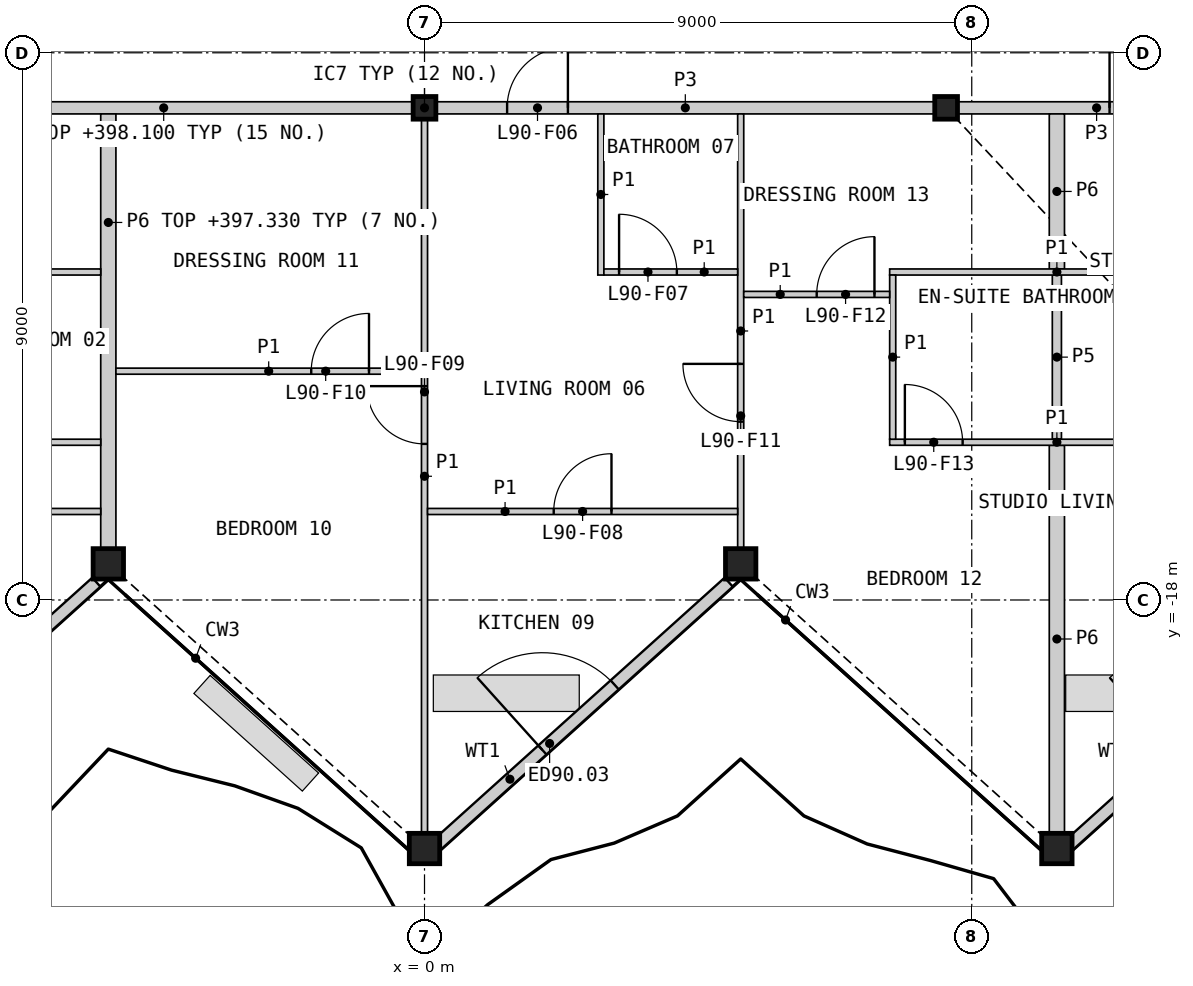
"""IFC4 building model, lengths in metres.
Left out: names, types, materials, properties, quantities, classifications, styles, units other than length and angle.
Written with IfcOpenShell. Run it as: python <this file> out.ifc"""

import sys

from ifc_helpers import new_model, si_unit, direction, frame, frame_2d, origin, origin_2d, place, context, subcontext, project, spatial, rectangle, hollow_rectangle, i_section, extrude, element, fill, save


model = new_model("IFC4")
c1 = context("Model", 3, precision=1e-05, world=origin(), true_north=direction((0.0, 1.0)))
c2 = subcontext(c1, "Body", "Model", "MODEL_VIEW")
j1 = project(units=[si_unit("LENGTHUNIT", "METRE"), si_unit("PLANEANGLEUNIT", "RADIAN")], contexts=[c1])
p1 = place(None, origin())
s1 = spatial("IfcSite", under=j1, at=p1, CompositionType="ELEMENT")
p2 = place(p1, origin())
s2 = spatial("IfcBuilding", under=s1, at=p2, CompositionType="ELEMENT")
p3 = place(p2, frame((0.0, 0.0, 395.0)))
s3 = spatial("IfcBuildingStorey", under=s2, at=p3, CompositionType="ELEMENT", Elevation=395.0)
for number, where, z_axis, x_axis in (
    (1, (-5.2, -17.406, 0.0), (0.0, 0.0, 1.0), (1.0, 0.0, 0.0)),
    (2, (0.0, -22.088, 0.0), (0.0, 0.0, 1.0), (1.0, 0.0, 0.0)),
    (3, (5.2, -17.406, 0.0), (0.0, 0.0, 1.0), (1.0, 0.0, 0.0)),
    (4, (10.4, -22.088, 0.0), (0.0, 0.0, 1.0), (1.0, 0.0, 0.0)),
):
    element("IfcColumn", number, at=place(p3, frame(where, z_axis=z_axis, x_axis=x_axis)), inside=s3, PredefinedType="COLUMN", context=c2, shape_type="SweptSolid", body=[
        extrude(hollow_rectangle(XDim=0.5, YDim=0.5, WallThickness=0.03, at=origin_2d()), origin(), (0.0, 0.0, 1.0), 3.4),
    ])
for number, where, z_axis, x_axis in (
    (5, (0.0, -9.906, 0.0), (0.0, 0.0, 1.0), (1.0, 0.0, 0.0)),
    (6, (8.578, -9.906, 0.0), (0.0, 0.0, 1.0), (1.0, 0.0, 0.0)),
):
    element("IfcColumn", number, at=place(p3, frame(where, z_axis=z_axis, x_axis=x_axis)), inside=s3, PredefinedType="COLUMN", context=c2, shape_type="SweptSolid", body=[
        extrude(i_section(OverallWidth=0.374, OverallDepth=0.372, WebThickness=0.016, FlangeThickness=0.026, at=origin_2d()), origin(), (0.0, 0.0, 1.0), 3.4),
    ])
p4 = place(p3, frame((-10.195, -22.028, 0.0), z_axis=(0.0, 0.0, 1.0), x_axis=(0.743136196971, 0.669140189162, 0.0)))
e7 = element("IfcWall", 7, at=p4, inside=s3, PredefinedType="SOLIDWALL", context=c2, shape_type="SweptSolid", body=[
    extrude(rectangle(XDim=6.457, YDim=0.2, at=frame_2d((3.229, 0.0))), origin(), (0.0, 0.0, 1.0), 2.634),
])
p5 = place(p4, frame((2.333, 0.0, 0.0)))
e8 = element("IfcOpeningElement", 8, at=p5, cuts=e7, PredefinedType="OPENING", context=c2, shape_type="SweptSolid", body=[
    extrude(rectangle(XDim=1.6, YDim=2.25, at=frame_2d((0.8, 1.125))), frame((0.0, 0.11, 0.0), z_axis=(0.0, -1.0, 0.0), x_axis=(1.0, 0.0, 0.0)), (0.0, 0.0, 1.0), 0.22),
])
p6 = place(p3, frame((0.205, -22.028, 0.0), z_axis=(0.0, 0.0, 1.0), x_axis=(0.743136196971, 0.669140189162, 0.0)))
e9 = element("IfcWall", 9, at=p6, inside=s3, PredefinedType="SOLIDWALL", context=c2, shape_type="SweptSolid", body=[
    extrude(rectangle(XDim=6.457, YDim=0.2, at=frame_2d((3.229, 0.0))), origin(), (0.0, 0.0, 1.0), 2.634),
])
p7 = place(p6, frame((2.333, 0.0, 0.0)))
e10 = element("IfcOpeningElement", 10, at=p7, cuts=e9, PredefinedType="OPENING", context=c2, shape_type="SweptSolid", body=[
    extrude(rectangle(XDim=1.6, YDim=2.25, at=frame_2d((0.8, 1.125))), frame((0.0, 0.11, 0.0), z_axis=(0.0, -1.0, 0.0), x_axis=(1.0, 0.0, 0.0)), (0.0, 0.0, 1.0), 0.22),
])
p8 = place(p3, frame((10.605, -22.028, 0.0), z_axis=(0.0, 0.0, 1.0), x_axis=(0.743153126052, 0.669121387522, 0.0)))
e11 = element("IfcWall", 11, at=p8, inside=s3, PredefinedType="SOLIDWALL", context=c2, shape_type="SweptSolid", body=[
    extrude(rectangle(XDim=6.457, YDim=0.2, at=frame_2d((3.229, 0.0))), origin(), (0.0, 0.0, 1.0), 2.634),
])
p9 = place(p8, frame((2.333, 0.0, 0.0)))
e12 = element("IfcOpeningElement", 12, at=p9, cuts=e11, PredefinedType="OPENING", context=c2, shape_type="SweptSolid", body=[
    extrude(rectangle(XDim=1.6, YDim=2.25, at=frame_2d((0.8, 1.125))), frame((0.0, 0.11, 0.0), z_axis=(0.0, -1.0, 0.0), x_axis=(1.0, 0.0, 0.0)), (0.0, 0.0, 1.0), 0.22),
])
p10 = place(p3, frame((-8.382, -9.906, 0.0), z_axis=(0.0, 0.0, 1.0), x_axis=(1.0, 0.0, 0.0)))
e13 = element("IfcWall", 13, at=p10, inside=s3, PredefinedType="PARTITIONING", context=c2, shape_type="SweptSolid", body=[
    extrude(rectangle(XDim=8.185, YDim=0.2, at=frame_2d((4.092, 0.0))), origin(), (0.0, 0.0, 1.0), 3.1),
])
p11 = place(p10, frame((1.162, 0.0, 0.0)))
e14 = element("IfcOpeningElement", 14, at=p11, cuts=e13, PredefinedType="OPENING", context=c2, shape_type="SweptSolid", body=[
    extrude(rectangle(XDim=1.0, YDim=2.1, at=frame_2d((0.5, 1.05))), frame((0.0, 0.11, 0.0), z_axis=(0.0, -1.0, 0.0), x_axis=(1.0, 0.0, 0.0)), (0.0, 0.0, 1.0), 0.22),
])
p12 = place(p3, frame((0.197, -9.906, 0.0), z_axis=(0.0, 0.0, 1.0), x_axis=(1.0, 0.0, 0.0)))
e15 = element("IfcWall", 15, at=p12, inside=s3, PredefinedType="PARTITIONING", context=c2, shape_type="SweptSolid", body=[
    extrude(rectangle(XDim=8.185, YDim=0.2, at=frame_2d((4.092, 0.0))), origin(), (0.0, 0.0, 1.0), 3.1),
])
p13 = place(p12, frame((1.162, 0.0, 0.0)))
e16 = element("IfcOpeningElement", 16, at=p13, cuts=e15, PredefinedType="OPENING", context=c2, shape_type="SweptSolid", body=[
    extrude(rectangle(XDim=1.0, YDim=2.1, at=frame_2d((0.5, 1.05))), frame((0.0, 0.11, 0.0), z_axis=(0.0, -1.0, 0.0), x_axis=(1.0, 0.0, 0.0)), (0.0, 0.0, 1.0), 0.22),
])
p14 = place(p3, frame((-5.2, -17.146, 0.0), z_axis=(0.0, 0.0, 1.0), x_axis=(0.0, 1.0, 0.0)))
e17 = element("IfcWall", 17, at=p14, inside=s3, PredefinedType="PARTITIONING", context=c2, shape_type="SweptSolid", body=[
    extrude(rectangle(XDim=7.14, YDim=0.25, at=frame_2d((3.57, 0.0))), origin(), (0.0, 0.0, 1.0), 2.33),
])
p15 = place(p3, frame((10.4, -21.828, 0.0), z_axis=(0.0, 0.0, 1.0), x_axis=(0.0, 1.0, 0.0)))
e18 = element("IfcWall", 18, at=p15, inside=s3, PredefinedType="PARTITIONING", context=c2, shape_type="SweptSolid", body=[
    extrude(rectangle(XDim=6.372, YDim=0.25, at=frame_2d((3.186, 0.0))), origin(), (0.0, 0.0, 1.0), 2.33),
])
p16 = place(p3, frame((8.775, -9.906, 0.0), z_axis=(0.0, 0.0, 1.0), x_axis=(1.0, 0.0, 0.0)))
e19 = element("IfcWall", 19, at=p16, inside=s3, PredefinedType="PARTITIONING", context=c2, shape_type="SweptSolid", body=[
    extrude(rectangle(XDim=4.555, YDim=0.2, at=frame_2d((2.278, 0.0))), origin(), (0.0, 0.0, 1.0), 3.1),
])
p17 = place(p16, frame((2.491, 0.0, 0.0)))
e20 = element("IfcOpeningElement", 20, at=p17, cuts=e19, PredefinedType="OPENING", context=c2, shape_type="SweptSolid", body=[
    extrude(rectangle(XDim=1.0, YDim=2.1, at=frame_2d((0.5, 1.05))), frame((0.0, 0.11, 0.0), z_axis=(0.0, -1.0, 0.0), x_axis=(1.0, 0.0, 0.0)), (0.0, 0.0, 1.0), 0.22),
])
p18 = place(p3, frame((10.4, -12.556, 0.0), z_axis=(0.0, 0.0, 1.0), x_axis=(0.0, 1.0, 0.0)))
e21 = element("IfcWall", 21, at=p18, inside=s3, PredefinedType="PARTITIONING", context=c2, shape_type="SweptSolid", body=[
    extrude(rectangle(XDim=2.55, YDim=0.25, at=frame_2d((1.275, 0.0))), origin(), (0.0, 0.0, 1.0), 2.33),
])
p19 = place(p3, frame((10.4, -15.356, 0.0), z_axis=(0.0, 0.0, 1.0), x_axis=(0.0, 1.0, 0.0)))
e22 = element("IfcWall", 22, at=p19, inside=s3, PredefinedType="PLUMBINGWALL", context=c2, shape_type="SweptSolid", body=[
    extrude(rectangle(XDim=2.7, YDim=0.15, at=frame_2d((1.35, 0.0))), origin(), (0.0, 0.0, 1.0), 2.33),
])
p20 = place(p3, frame((0.0, -21.828, 0.0), z_axis=(0.0, 0.0, 1.0), x_axis=(0.0, 1.0, 0.0)))
e23 = element("IfcWall", 23, at=p20, inside=s3, PredefinedType="PARTITIONING", context=c2, shape_type="SweptSolid", body=[
    extrude(rectangle(XDim=11.725, YDim=0.1, at=frame_2d((5.863, 0.0))), origin(), (0.0, 0.0, 1.0), 2.33),
])
p21 = place(p20, frame((6.395, 0.0, 0.0)))
e24 = element("IfcOpeningElement", 24, at=p21, cuts=e23, PredefinedType="OPENING", context=c2, shape_type="SweptSolid", body=[
    extrude(rectangle(XDim=0.95, YDim=2.1, at=frame_2d((0.475, 1.05))), frame((0.0, 0.06, 0.0), z_axis=(0.0, -1.0, 0.0), x_axis=(1.0, 0.0, 0.0)), (0.0, 0.0, 1.0), 0.12),
])
p22 = place(p3, frame((5.2, -17.146, 0.0), z_axis=(0.0, 0.0, 1.0), x_axis=(0.0, 1.0, 0.0)))
e25 = element("IfcWall", 25, at=p22, inside=s3, PredefinedType="PARTITIONING", context=c2, shape_type="SweptSolid", body=[
    extrude(rectangle(XDim=7.14, YDim=0.1, at=frame_2d((3.57, 0.0))), origin(), (0.0, 0.0, 1.0), 2.33),
])
p23 = place(p22, frame((2.079, 0.0, 0.0)))
e26 = element("IfcOpeningElement", 26, at=p23, cuts=e25, PredefinedType="OPENING", context=c2, shape_type="SweptSolid", body=[
    extrude(rectangle(XDim=0.95, YDim=2.1, at=frame_2d((0.475, 1.05))), frame((0.0, 0.06, 0.0), z_axis=(0.0, -1.0, 0.0), x_axis=(1.0, 0.0, 0.0)), (0.0, 0.0, 1.0), 0.12),
])
p24 = place(p3, frame((7.65, -12.606, 0.0), z_axis=(0.0, 0.0, 1.0), x_axis=(1.0, 0.0, 0.0)))
e27 = element("IfcWall", 27, at=p24, inside=s3, PredefinedType="PARTITIONING", context=c2, shape_type="SweptSolid", body=[
    extrude(rectangle(XDim=5.5, YDim=0.1, at=frame_2d((2.75, 0.0))), origin(), (0.0, 0.0, 1.0), 2.33),
])
p25 = place(p3, frame((7.65, -15.406, 0.0), z_axis=(0.0, 0.0, 1.0), x_axis=(1.0, 0.0, 0.0)))
e28 = element("IfcWall", 28, at=p25, inside=s3, PredefinedType="PARTITIONING", context=c2, shape_type="SweptSolid", body=[
    extrude(rectangle(XDim=5.5, YDim=0.1, at=frame_2d((2.75, 0.0))), origin(), (0.0, 0.0, 1.0), 2.33),
])
p26 = place(p25, frame((0.25, 0.0, 0.0)))
e29 = element("IfcOpeningElement", 29, at=p26, cuts=e28, PredefinedType="OPENING", context=c2, shape_type="SweptSolid", body=[
    extrude(rectangle(XDim=0.95, YDim=2.1, at=frame_2d((0.475, 1.05))), frame((0.0, 0.06, 0.0), z_axis=(0.0, -1.0, 0.0), x_axis=(1.0, 0.0, 0.0)), (0.0, 0.0, 1.0), 0.12),
])
p27 = place(p25, frame((4.3, 0.0, 0.0)))
e30 = element("IfcOpeningElement", 30, at=p27, cuts=e28, PredefinedType="OPENING", context=c2, shape_type="SweptSolid", body=[
    extrude(rectangle(XDim=0.95, YDim=2.1, at=frame_2d((0.475, 1.05))), frame((0.0, 0.06, 0.0), z_axis=(0.0, -1.0, 0.0), x_axis=(1.0, 0.0, 0.0)), (0.0, 0.0, 1.0), 0.12),
])
p28 = place(p3, frame((-10.35, -16.544, 0.0), z_axis=(0.0, 0.0, 1.0), x_axis=(1.0, 0.0, 0.0)))
e31 = element("IfcWall", 31, at=p28, inside=s3, PredefinedType="PARTITIONING", context=c2, shape_type="SweptSolid", body=[
    extrude(rectangle(XDim=5.025, YDim=0.1, at=frame_2d((2.513, 0.0))), origin(), (0.0, 0.0, 1.0), 2.33),
])
p29 = place(p28, frame((0.761, 0.0, 0.0)))
e32 = element("IfcOpeningElement", 32, at=p29, cuts=e31, PredefinedType="OPENING", context=c2, shape_type="SweptSolid", body=[
    extrude(rectangle(XDim=0.95, YDim=2.1, at=frame_2d((0.475, 1.05))), frame((0.0, 0.06, 0.0), z_axis=(0.0, -1.0, 0.0), x_axis=(1.0, 0.0, 0.0)), (0.0, 0.0, 1.0), 0.12),
])
p30 = place(p3, frame((0.05, -16.544, 0.0), z_axis=(0.0, 0.0, 1.0), x_axis=(1.0, 0.0, 0.0)))
e33 = element("IfcWall", 33, at=p30, inside=s3, PredefinedType="PARTITIONING", context=c2, shape_type="SweptSolid", body=[
    extrude(rectangle(XDim=5.1, YDim=0.1, at=frame_2d((2.55, 0.0))), origin(), (0.0, 0.0, 1.0), 2.33),
])
p31 = place(p30, frame((2.075, 0.0, 0.0)))
e34 = element("IfcOpeningElement", 34, at=p31, cuts=e33, PredefinedType="OPENING", context=c2, shape_type="SweptSolid", body=[
    extrude(rectangle(XDim=0.95, YDim=2.1, at=frame_2d((0.475, 1.05))), frame((0.0, 0.06, 0.0), z_axis=(0.0, -1.0, 0.0), x_axis=(1.0, 0.0, 0.0)), (0.0, 0.0, 1.0), 0.12),
])
p32 = place(p3, frame((-5.075, -14.237, 0.0), z_axis=(0.0, 0.0, 1.0), x_axis=(1.0, 0.0, 0.0)))
e35 = element("IfcWall", 35, at=p32, inside=s3, PredefinedType="PARTITIONING", context=c2, shape_type="SweptSolid", body=[
    extrude(rectangle(XDim=5.025, YDim=0.1, at=frame_2d((2.512, 0.0))), origin(), (0.0, 0.0, 1.0), 2.33),
])
p33 = place(p32, frame((3.212, 0.0, 0.0)))
e36 = element("IfcOpeningElement", 36, at=p33, cuts=e35, PredefinedType="OPENING", context=c2, shape_type="SweptSolid", body=[
    extrude(rectangle(XDim=0.95, YDim=2.1, at=frame_2d((0.475, 1.05))), frame((0.0, 0.06, 0.0), z_axis=(0.0, -1.0, 0.0), x_axis=(1.0, 0.0, 0.0)), (0.0, 0.0, 1.0), 0.12),
])
p34 = place(p3, frame((7.7, -15.356, 0.0), z_axis=(0.0, 0.0, 1.0), x_axis=(0.0, 1.0, 0.0)))
e37 = element("IfcWall", 37, at=p34, inside=s3, PredefinedType="PARTITIONING", context=c2, shape_type="SweptSolid", body=[
    extrude(rectangle(XDim=2.7, YDim=0.1, at=frame_2d((1.35, 0.0))), origin(), (0.0, 0.0, 1.0), 2.33),
])
p35 = place(p3, frame((2.9, -12.656, 0.0), z_axis=(0.0, 0.0, 1.0), x_axis=(0.0, 1.0, 0.0)))
e38 = element("IfcWall", 38, at=p35, inside=s3, PredefinedType="PARTITIONING", context=c2, shape_type="SweptSolid", body=[
    extrude(rectangle(XDim=2.65, YDim=0.1, at=frame_2d((1.325, 0.0))), origin(), (0.0, 0.0, 1.0), 2.33),
])
for number, where, z_axis, x_axis in (
    (39, (-7.85, -12.606, 0.0), (0.0, 0.0, 1.0), (1.0, 0.0, 0.0)),
    (40, (-7.85, -15.406, 0.0), (0.0, 0.0, 1.0), (1.0, 0.0, 0.0)),
):
    element("IfcWall", number, at=place(p3, frame(where, z_axis=z_axis, x_axis=x_axis)), inside=s3, PredefinedType="PARTITIONING", context=c2, shape_type="SweptSolid", body=[
        extrude(rectangle(XDim=2.525, YDim=0.1, at=frame_2d((1.263, 0.0))), origin(), (0.0, 0.0, 1.0), 2.33),
    ])
p36 = place(p3, frame((5.25, -12.974, 0.0), z_axis=(0.0, 0.0, 1.0), x_axis=(1.0, 0.0, 0.0)))
e41 = element("IfcWall", 41, at=p36, inside=s3, PredefinedType="PARTITIONING", context=c2, shape_type="SweptSolid", body=[
    extrude(rectangle(XDim=2.4, YDim=0.1, at=frame_2d((1.2, 0.0))), origin(), (0.0, 0.0, 1.0), 2.33),
])
p37 = place(p36, frame((1.2, 0.0, 0.0)))
e42 = element("IfcOpeningElement", 42, at=p37, cuts=e41, PredefinedType="OPENING", context=c2, shape_type="SweptSolid", body=[
    extrude(rectangle(XDim=0.95, YDim=2.1, at=frame_2d((0.475, 1.05))), frame((0.0, 0.06, 0.0), z_axis=(0.0, -1.0, 0.0), x_axis=(1.0, 0.0, 0.0)), (0.0, 0.0, 1.0), 0.12),
])
p38 = place(p3, frame((2.95, -12.606, 0.0), z_axis=(0.0, 0.0, 1.0), x_axis=(1.0, 0.0, 0.0)))
e43 = element("IfcWall", 43, at=p38, inside=s3, PredefinedType="PARTITIONING", context=c2, shape_type="SweptSolid", body=[
    extrude(rectangle(XDim=2.2, YDim=0.1, at=frame_2d((1.1, 0.0))), origin(), (0.0, 0.0, 1.0), 2.33),
])
p39 = place(p38, frame((0.25, 0.0, 0.0)))
e44 = element("IfcOpeningElement", 44, at=p39, cuts=e43, PredefinedType="OPENING", context=c2, shape_type="SweptSolid", body=[
    extrude(rectangle(XDim=0.95, YDim=2.1, at=frame_2d((0.475, 1.05))), frame((0.0, 0.06, 0.0), z_axis=(0.0, -1.0, 0.0), x_axis=(1.0, 0.0, 0.0)), (0.0, 0.0, 1.0), 0.12),
])
p40 = place(p7, origin())
e45 = element("IfcDoor", 45, at=p40, inside=s3, OperationType="DOUBLE_DOOR_SINGLE_SWING", PredefinedType="DOOR", context=c2, shape_type="SweptSolid", body=[
    extrude(rectangle(XDim=1.6, YDim=2.25, at=frame_2d((0.8, 1.125))), frame((0.0, 0.025, 0.0), z_axis=(0.0, -1.0, 0.0), x_axis=(1.0, 0.0, 0.0)), (0.0, 0.0, 1.0), 0.05),
])
fill(e10, e45)
p41 = place(p13, origin())
e46 = element("IfcDoor", 46, at=p41, inside=s3, OperationType="SINGLE_SWING_RIGHT", PredefinedType="DOOR", context=c2, shape_type="SweptSolid", body=[
    extrude(rectangle(XDim=1.0, YDim=2.1, at=frame_2d((0.5, 1.05))), frame((0.0, 0.025, 0.0), z_axis=(0.0, -1.0, 0.0), x_axis=(1.0, 0.0, 0.0)), (0.0, 0.0, 1.0), 0.05),
])
fill(e16, e46)
p42 = place(p39, origin())
e47 = element("IfcDoor", 47, at=p42, inside=s3, OperationType="SINGLE_SWING_LEFT", PredefinedType="DOOR", context=c2, shape_type="SweptSolid", body=[
    extrude(rectangle(XDim=0.95, YDim=2.1, at=frame_2d((0.475, 1.05))), frame((0.0, 0.025, 0.0), z_axis=(0.0, -1.0, 0.0), x_axis=(1.0, 0.0, 0.0)), (0.0, 0.0, 1.0), 0.05),
])
fill(e44, e47)
p43 = place(p31, origin())
e48 = element("IfcDoor", 48, at=p43, inside=s3, OperationType="SINGLE_SWING_RIGHT", PredefinedType="DOOR", context=c2, shape_type="SweptSolid", body=[
    extrude(rectangle(XDim=0.95, YDim=2.1, at=frame_2d((0.475, 1.05))), frame((0.0, 0.025, 0.0), z_axis=(0.0, -1.0, 0.0), x_axis=(1.0, 0.0, 0.0)), (0.0, 0.0, 1.0), 0.05),
])
fill(e34, e48)
p44 = place(p21, origin())
e49 = element("IfcDoor", 49, at=p44, inside=s3, OperationType="SINGLE_SWING_RIGHT", PredefinedType="DOOR", context=c2, shape_type="SweptSolid", body=[
    extrude(rectangle(XDim=0.95, YDim=2.1, at=frame_2d((0.475, 1.05))), frame((0.0, 0.025, 0.0), z_axis=(0.0, -1.0, 0.0), x_axis=(1.0, 0.0, 0.0)), (0.0, 0.0, 1.0), 0.05),
])
fill(e24, e49)
p45 = place(p33, origin())
e50 = element("IfcDoor", 50, at=p45, inside=s3, OperationType="SINGLE_SWING_RIGHT", PredefinedType="DOOR", context=c2, shape_type="SweptSolid", body=[
    extrude(rectangle(XDim=0.95, YDim=2.1, at=frame_2d((0.475, 1.05))), frame((0.0, 0.025, 0.0), z_axis=(0.0, -1.0, 0.0), x_axis=(1.0, 0.0, 0.0)), (0.0, 0.0, 1.0), 0.05),
])
fill(e36, e50)
p46 = place(p23, origin())
e51 = element("IfcDoor", 51, at=p46, inside=s3, OperationType="SINGLE_SWING_RIGHT", PredefinedType="DOOR", context=c2, shape_type="SweptSolid", body=[
    extrude(rectangle(XDim=0.95, YDim=2.1, at=frame_2d((0.475, 1.05))), frame((0.0, 0.025, 0.0), z_axis=(0.0, -1.0, 0.0), x_axis=(1.0, 0.0, 0.0)), (0.0, 0.0, 1.0), 0.05),
])
fill(e26, e51)
p47 = place(p37, origin())
e52 = element("IfcDoor", 52, at=p47, inside=s3, OperationType="SINGLE_SWING_RIGHT", PredefinedType="DOOR", context=c2, shape_type="SweptSolid", body=[
    extrude(rectangle(XDim=0.95, YDim=2.1, at=frame_2d((0.475, 1.05))), frame((0.0, 0.025, 0.0), z_axis=(0.0, -1.0, 0.0), x_axis=(1.0, 0.0, 0.0)), (0.0, 0.0, 1.0), 0.05),
])
fill(e42, e52)
p48 = place(p26, origin())
e53 = element("IfcDoor", 53, at=p48, inside=s3, OperationType="SINGLE_SWING_LEFT", PredefinedType="DOOR", context=c2, shape_type="SweptSolid", body=[
    extrude(rectangle(XDim=0.95, YDim=2.1, at=frame_2d((0.475, 1.05))), frame((0.0, 0.025, 0.0), z_axis=(0.0, -1.0, 0.0), x_axis=(1.0, 0.0, 0.0)), (0.0, 0.0, 1.0), 0.05),
])
fill(e29, e53)
p49 = place(p17, origin())
e54 = element("IfcDoor", 54, at=p49, inside=s3, OperationType="SINGLE_SWING_LEFT", PredefinedType="DOOR", context=c2, shape_type="SweptSolid", body=[
    extrude(rectangle(XDim=1.0, YDim=2.1, at=frame_2d((0.5, 1.05))), frame((0.0, 0.025, 0.0), z_axis=(0.0, -1.0, 0.0), x_axis=(1.0, 0.0, 0.0)), (0.0, 0.0, 1.0), 0.05),
])
fill(e20, e54)
save(model, sys.argv[1])
